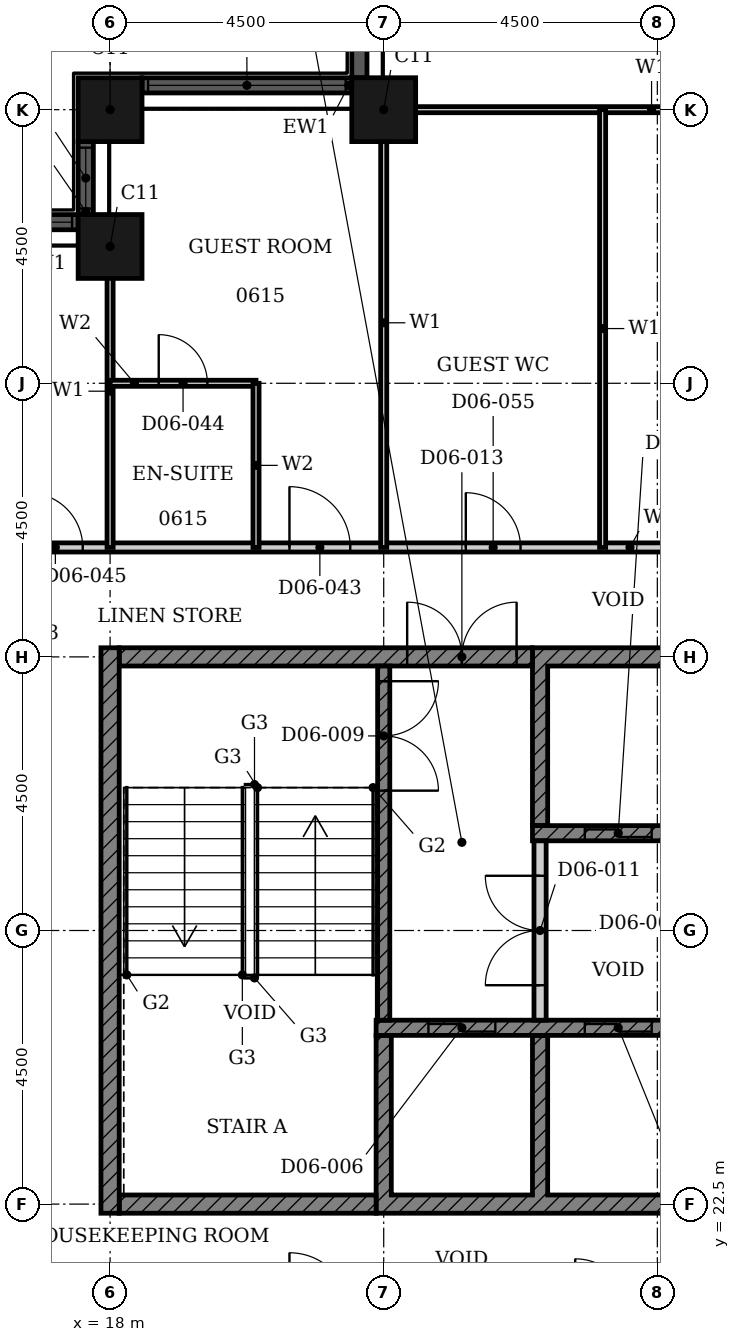
"""IFC4 building model, lengths in metres.
Left out: names, types, materials, properties, quantities, classifications, styles, units other than length and angle.
Written with IfcOpenShell. Run it as: python <this file> out.ifc"""

import sys

from ifc_helpers import new_model, si_unit, direction, frame, frame_2d, origin, origin_2d, place, context, subcontext, project, spatial, polyline, rectangle, hollow_rectangle, outline, extrude, element, fill, save


model = new_model("IFC4")
c1 = context("Model", 3, precision=1e-05, world=origin(), true_north=direction((0.0, 1.0)))
c2 = subcontext(c1, "Body", "Model", "MODEL_VIEW")
j1 = project(units=[si_unit("LENGTHUNIT", "METRE"), si_unit("PLANEANGLEUNIT", "RADIAN")], contexts=[c1])
p1 = place(None, origin())
s1 = spatial("IfcSite", under=j1, at=p1, CompositionType="ELEMENT")
p2 = place(p1, origin())
s2 = spatial("IfcBuilding", under=s1, at=p2, CompositionType="ELEMENT")
p3 = place(p2, frame((0.0, 0.0, 33.6)))
s3 = spatial("IfcBuildingStorey", under=s2, at=p3, CompositionType="ELEMENT", Elevation=33.6)
for number, where, z_axis, x_axis in (
    (1, (22.5, 40.5, 0.0), (0.0, 0.0, 1.0), (1.0, 0.0, 0.0)),
    (2, (18.0, 40.5, 0.0), (0.0, 0.0, 1.0), (1.0, 0.0, 0.0)),
    (3, (18.0, 38.25, 0.0), (0.0, 0.0, 1.0), (1.0, 0.0, 0.0)),
):
    element("IfcColumn", number, at=place(p3, frame(where, z_axis=z_axis, x_axis=x_axis)), inside=s3, PredefinedType="COLUMN", context=c2, shape_type="SweptSolid", body=[
        extrude(hollow_rectangle(XDim=1.05, YDim=1.05, WallThickness=0.034, at=origin_2d()), origin(), (0.0, 0.0, 1.0), 3.6),
    ])
p4 = place(p3, frame((22.1, 48.975, 0.0), z_axis=(0.0, 0.0, 1.0), x_axis=(0.0, -1.0, 0.0)))
e4 = element("IfcWall", 4, at=p4, inside=s3, PredefinedType="SOLIDWALL", context=c2, shape_type="SweptSolid", body=[
    extrude(rectangle(XDim=7.95, YDim=0.25, at=frame_2d((3.975, 0.0))), origin(), (0.0, 0.0, 1.0), 3.6),
])
p5 = place(p4, frame((0.1, 0.0, 0.9)))
e5 = element("IfcOpeningElement", 5, at=p5, cuts=e4, PredefinedType="OPENING", context=c2, shape_type="SweptSolid", body=[
    extrude(rectangle(XDim=3.25, YDim=2.08, at=frame_2d((1.625, 1.04))), frame((0.0, 0.135, 0.0), z_axis=(0.0, -1.0, 0.0), x_axis=(1.0, 0.0, 0.0)), (0.0, 0.0, 1.0), 0.27),
])
p6 = place(p4, frame((5.325, 0.0, 0.0)))
e6 = element("IfcOpeningElement", 6, at=p6, cuts=e4, PredefinedType="OPENING", context=c2, shape_type="SweptSolid", body=[
    extrude(rectangle(XDim=1.8, YDim=2.4, at=frame_2d((0.9, 1.2))), frame((0.0, 0.135, 0.0), z_axis=(0.0, -1.0, 0.0), x_axis=(1.0, 0.0, 0.0)), (0.0, 0.0, 1.0), 0.27),
])
p7 = place(p3, frame((21.975, 40.9, 0.0), z_axis=(0.0, 0.0, 1.0), x_axis=(-1.0, 0.0, 0.0)))
e7 = element("IfcWall", 7, at=p7, inside=s3, PredefinedType="SOLIDWALL", context=c2, shape_type="SweptSolid", body=[
    extrude(rectangle(XDim=3.45, YDim=0.25, at=frame_2d((1.725, 0.0))), origin(), (0.0, 0.0, 1.0), 3.6),
])
p8 = place(p7, frame((0.1, 0.0, 0.9)))
e8 = element("IfcOpeningElement", 8, at=p8, cuts=e7, PredefinedType="OPENING", context=c2, shape_type="SweptSolid", body=[
    extrude(rectangle(XDim=3.25, YDim=2.08, at=frame_2d((1.625, 1.04))), frame((0.0, 0.135, 0.0), z_axis=(0.0, -1.0, 0.0), x_axis=(1.0, 0.0, 0.0)), (0.0, 0.0, 1.0), 0.27),
])
p9 = place(p3, frame((17.6, 39.975, 0.0), z_axis=(0.0, 0.0, 1.0), x_axis=(0.0, -1.0, 0.0)))
e9 = element("IfcWall", 9, at=p9, inside=s3, PredefinedType="SOLIDWALL", context=c2, shape_type="SweptSolid", body=[
    extrude(rectangle(XDim=1.2, YDim=0.25, at=frame_2d((0.6, 0.0))), origin(), (0.0, 0.0, 1.0), 3.6),
])
p10 = place(p9, frame((0.1, 0.0, 0.9)))
e10 = element("IfcOpeningElement", 10, at=p10, cuts=e9, PredefinedType="OPENING", context=c2, shape_type="SweptSolid", body=[
    extrude(rectangle(XDim=1.0, YDim=2.08, at=frame_2d((0.5, 1.04))), frame((0.0, 0.135, 0.0), z_axis=(0.0, -1.0, 0.0), x_axis=(1.0, 0.0, 0.0)), (0.0, 0.0, 1.0), 0.27),
])
p11 = place(p3, frame((17.475, 38.65, 0.0), z_axis=(0.0, 0.0, 1.0), x_axis=(-1.0, 0.0, 0.0)))
e11 = element("IfcWall", 11, at=p11, inside=s3, PredefinedType="SOLIDWALL", context=c2, shape_type="SweptSolid", body=[
    extrude(rectangle(XDim=1.2, YDim=0.25, at=frame_2d((0.6, 0.0))), origin(), (0.0, 0.0, 1.0), 3.6),
])
p12 = place(p11, frame((0.1, 0.0, 0.9)))
e12 = element("IfcOpeningElement", 12, at=p12, cuts=e11, PredefinedType="OPENING", context=c2, shape_type="SweptSolid", body=[
    extrude(rectangle(XDim=1.0, YDim=2.08, at=frame_2d((0.5, 1.04))), frame((0.0, 0.135, 0.0), z_axis=(0.0, -1.0, 0.0), x_axis=(1.0, 0.0, 0.0)), (0.0, 0.0, 1.0), 0.27),
])
p13 = place(p3, origin())
e13 = element("IfcWall", 13, at=p13, inside=s3, PredefinedType="SHEAR", context=c2, shape_type="SweptSolid", body=[
    extrude(outline(polyline([(22.375, 22.35), (38.053, 22.35), (38.053, 25.275), (37.803, 25.275), (37.803, 22.65), (35.482, 22.65), (35.482, 25.275), (35.232, 25.275), (35.232, 22.65), (32.911, 22.65), (32.911, 25.275), (32.661, 25.275), (32.661, 22.65), (30.339, 22.65), (30.339, 25.275), (30.089, 25.275), (30.089, 22.65), (27.768, 22.65), (27.768, 25.275), (27.518, 25.275), (27.518, 22.65), (25.197, 22.65), (25.197, 25.275), (24.947, 25.275), (24.947, 22.65), (22.625, 22.65), (22.625, 25.275), (22.375, 25.275), (22.375, 22.35)])), origin(), (0.0, 0.0, 1.0), 3.3),
])
p14 = place(p3, origin())
e14 = element("IfcWall", 14, at=p14, inside=s3, PredefinedType="SHEAR", context=c2, shape_type="SweptSolid", body=[
    extrude(outline(polyline([(24.947, 28.725), (25.197, 28.725), (25.197, 31.35), (27.518, 31.35), (27.518, 28.725), (27.768, 28.725), (27.768, 31.35), (30.089, 31.35), (30.089, 28.725), (30.339, 28.725), (30.339, 31.35), (32.661, 31.35), (32.661, 28.725), (32.911, 28.725), (32.911, 31.35), (35.232, 31.35), (35.232, 28.725), (35.482, 28.725), (35.482, 31.35), (37.803, 31.35), (37.803, 28.725), (38.053, 28.725), (38.053, 31.35), (40.375, 31.35), (40.375, 28.725), (40.625, 28.725), (40.625, 31.65), (24.947, 31.65), (24.947, 28.725)])), origin(), (0.0, 0.0, 1.0), 3.3),
])
p15 = place(p3, frame((18.15, 22.5, 0.0), z_axis=(0.0, 0.0, 1.0), x_axis=(1.0, 0.0, 0.0)))
e15 = element("IfcWall", 15, at=p15, inside=s3, PredefinedType="SHEAR", context=c2, shape_type="SweptSolid", body=[
    extrude(rectangle(XDim=4.225, YDim=0.3, at=frame_2d((2.113, 0.0))), origin(), (0.0, 0.0, 1.0), 3.3),
])
p16 = place(p3, frame((18.15, 31.5, 0.0), z_axis=(0.0, 0.0, 1.0), x_axis=(1.0, 0.0, 0.0)))
e16 = element("IfcWall", 16, at=p16, inside=s3, PredefinedType="SHEAR", context=c2, shape_type="SweptSolid", body=[
    extrude(rectangle(XDim=6.797, YDim=0.3, at=frame_2d((3.398, 0.0))), origin(), (0.0, 0.0, 1.0), 3.3),
])
p17 = place(p16, frame((4.736, 0.0, 0.0)))
e17 = element("IfcOpeningElement", 17, at=p17, cuts=e16, PredefinedType="OPENING", context=c2, shape_type="SweptSolid", body=[
    extrude(rectangle(XDim=1.8, YDim=2.1, at=frame_2d((0.9, 1.05))), frame((0.0, 0.16, 0.0), z_axis=(0.0, -1.0, 0.0), x_axis=(1.0, 0.0, 0.0)), (0.0, 0.0, 1.0), 0.32),
])
p18 = place(p3, frame((18.0, 22.35, 0.0), z_axis=(0.0, 0.0, 1.0), x_axis=(0.0, 1.0, 0.0)))
e18 = element("IfcWall", 18, at=p18, inside=s3, PredefinedType="SHEAR", context=c2, shape_type="SweptSolid", body=[
    extrude(rectangle(XDim=9.3, YDim=0.3, at=frame_2d((4.65, 0.0))), origin(), (0.0, 0.0, 1.0), 3.3),
])
p19 = place(p3, frame((22.375, 25.4, 0.0), z_axis=(0.0, 0.0, 1.0), x_axis=(1.0, 0.0, 0.0)))
e19 = element("IfcWall", 19, at=p19, inside=s3, PredefinedType="SHEAR", context=c2, shape_type="SweptSolid", body=[
    extrude(rectangle(XDim=15.678, YDim=0.25, at=frame_2d((7.839, 0.0))), origin(), (0.0, 0.0, 1.0), 3.3),
])
p20 = place(p19, frame((3.432, 0.0, 0.0)))
e20 = element("IfcOpeningElement", 20, at=p20, cuts=e19, PredefinedType="OPENING", context=c2, shape_type="SweptSolid", body=[
    extrude(rectangle(XDim=1.1, YDim=2.1, at=frame_2d((0.55, 1.05))), frame((0.0, 0.135, 0.0), z_axis=(0.0, -1.0, 0.0), x_axis=(1.0, 0.0, 0.0)), (0.0, 0.0, 1.0), 0.27),
])
p21 = place(p19, frame((11.146, 0.0, 0.0)))
e21 = element("IfcOpeningElement", 21, at=p21, cuts=e19, PredefinedType="OPENING", context=c2, shape_type="SweptSolid", body=[
    extrude(rectangle(XDim=1.1, YDim=2.1, at=frame_2d((0.55, 1.05))), frame((0.0, 0.135, 0.0), z_axis=(0.0, -1.0, 0.0), x_axis=(1.0, 0.0, 0.0)), (0.0, 0.0, 1.0), 0.27),
])
p22 = place(p19, frame((13.718, 0.0, 0.0)))
e22 = element("IfcOpeningElement", 22, at=p22, cuts=e19, PredefinedType="OPENING", context=c2, shape_type="SweptSolid", body=[
    extrude(rectangle(XDim=1.1, YDim=2.1, at=frame_2d((0.55, 1.05))), frame((0.0, 0.135, 0.0), z_axis=(0.0, -1.0, 0.0), x_axis=(1.0, 0.0, 0.0)), (0.0, 0.0, 1.0), 0.27),
])
p23 = place(p19, frame((0.861, 0.0, 0.0)))
e23 = element("IfcOpeningElement", 23, at=p23, cuts=e19, PredefinedType="OPENING", context=c2, shape_type="SweptSolid", body=[
    extrude(rectangle(XDim=1.1, YDim=2.1, at=frame_2d((0.55, 1.05))), frame((0.0, 0.135, 0.0), z_axis=(0.0, -1.0, 0.0), x_axis=(1.0, 0.0, 0.0)), (0.0, 0.0, 1.0), 0.27),
])
p24 = place(p3, frame((24.947, 28.6, 0.0), z_axis=(0.0, 0.0, 1.0), x_axis=(1.0, 0.0, 0.0)))
e24 = element("IfcWall", 24, at=p24, inside=s3, PredefinedType="SHEAR", context=c2, shape_type="SweptSolid", body=[
    extrude(rectangle(XDim=15.678, YDim=0.25, at=frame_2d((7.839, 0.0))), origin(), (0.0, 0.0, 1.0), 3.3),
])
p25 = place(p24, frame((0.861, 0.0, 0.0)))
e25 = element("IfcOpeningElement", 25, at=p25, cuts=e24, PredefinedType="OPENING", context=c2, shape_type="SweptSolid", body=[
    extrude(rectangle(XDim=1.1, YDim=2.1, at=frame_2d((0.55, 1.05))), frame((0.0, 0.135, 0.0), z_axis=(0.0, -1.0, 0.0), x_axis=(1.0, 0.0, 0.0)), (0.0, 0.0, 1.0), 0.27),
])
p26 = place(p24, frame((8.575, 0.0, 0.0)))
e26 = element("IfcOpeningElement", 26, at=p26, cuts=e24, PredefinedType="OPENING", context=c2, shape_type="SweptSolid", body=[
    extrude(rectangle(XDim=1.1, YDim=2.1, at=frame_2d((0.55, 1.05))), frame((0.0, 0.135, 0.0), z_axis=(0.0, -1.0, 0.0), x_axis=(1.0, 0.0, 0.0)), (0.0, 0.0, 1.0), 0.27),
])
p27 = place(p24, frame((13.718, 0.0, 0.0)))
e27 = element("IfcOpeningElement", 27, at=p27, cuts=e24, PredefinedType="OPENING", context=c2, shape_type="SweptSolid", body=[
    extrude(rectangle(XDim=1.1, YDim=2.1, at=frame_2d((0.55, 1.05))), frame((0.0, 0.135, 0.0), z_axis=(0.0, -1.0, 0.0), x_axis=(1.0, 0.0, 0.0)), (0.0, 0.0, 1.0), 0.27),
])
p28 = place(p3, frame((22.5, 31.35, 0.0), z_axis=(0.0, 0.0, 1.0), x_axis=(0.0, -1.0, 0.0)))
e28 = element("IfcWall", 28, at=p28, inside=s3, PredefinedType="SHEAR", context=c2, shape_type="SweptSolid", body=[
    extrude(rectangle(XDim=5.825, YDim=0.2, at=frame_2d((2.913, 0.0))), origin(), (0.0, 0.0, 1.0), 3.3),
])
p29 = place(p28, frame((0.25, 0.0, 0.0)))
e29 = element("IfcOpeningElement", 29, at=p29, cuts=e28, PredefinedType="OPENING", context=c2, shape_type="SweptSolid", body=[
    extrude(rectangle(XDim=1.8, YDim=2.1, at=frame_2d((0.9, 1.05))), frame((0.0, 0.11, 0.0), z_axis=(0.0, -1.0, 0.0), x_axis=(1.0, 0.0, 0.0)), (0.0, 0.0, 1.0), 0.22),
])
p30 = place(p3, frame((25.072, 25.525, 0.0), z_axis=(0.0, 0.0, 1.0), x_axis=(0.0, 1.0, 0.0)))
e30 = element("IfcWall", 30, at=p30, inside=s3, PredefinedType="PARTITIONING", context=c2, shape_type="SweptSolid", body=[
    extrude(rectangle(XDim=2.95, YDim=0.2, at=frame_2d((1.475, 0.0))), origin(), (0.0, 0.0, 1.0), 3.3),
])
p31 = place(p30, frame((0.575, 0.0, 0.0)))
e31 = element("IfcOpeningElement", 31, at=p31, cuts=e30, PredefinedType="OPENING", context=c2, shape_type="SweptSolid", body=[
    extrude(rectangle(XDim=1.8, YDim=2.1, at=frame_2d((0.9, 1.05))), frame((0.0, 0.11, 0.0), z_axis=(0.0, -1.0, 0.0), x_axis=(1.0, 0.0, 0.0)), (0.0, 0.0, 1.0), 0.22),
])
p32 = place(p3, frame((16.2, 33.3, 0.0), z_axis=(0.0, 0.0, 1.0), x_axis=(1.0, 0.0, 0.0)))
e32 = element("IfcWall", 32, at=p32, inside=s3, PredefinedType="PARTITIONING", context=c2, shape_type="SweptSolid", body=[
    extrude(rectangle(XDim=15.3, YDim=0.15, at=frame_2d((7.65, 0.0))), origin(), (0.0, 0.0, 1.0), 3.3),
])
p33 = place(p32, frame((4.75, 0.0, 0.0)))
e33 = element("IfcOpeningElement", 33, at=p33, cuts=e32, PredefinedType="OPENING", context=c2, shape_type="SweptSolid", body=[
    extrude(rectangle(XDim=1.0, YDim=2.1, at=frame_2d((0.5, 1.05))), frame((0.0, 0.085, 0.0), z_axis=(0.0, -1.0, 0.0), x_axis=(1.0, 0.0, 0.0)), (0.0, 0.0, 1.0), 0.17),
])
p34 = place(p32, frame((0.45, 0.0, 0.0)))
e34 = element("IfcOpeningElement", 34, at=p34, cuts=e32, PredefinedType="OPENING", context=c2, shape_type="SweptSolid", body=[
    extrude(rectangle(XDim=0.9, YDim=2.1, at=frame_2d((0.45, 1.05))), frame((0.0, 0.085, 0.0), z_axis=(0.0, -1.0, 0.0), x_axis=(1.0, 0.0, 0.0)), (0.0, 0.0, 1.0), 0.17),
])
p35 = place(p32, frame((7.65, 0.0, 0.0)))
e35 = element("IfcOpeningElement", 35, at=p35, cuts=e32, PredefinedType="OPENING", context=c2, shape_type="SweptSolid", body=[
    extrude(rectangle(XDim=0.9, YDim=2.1, at=frame_2d((0.45, 1.05))), frame((0.0, 0.085, 0.0), z_axis=(0.0, -1.0, 0.0), x_axis=(1.0, 0.0, 0.0)), (0.0, 0.0, 1.0), 0.17),
])
p36 = place(p32, frame((12.15, 0.0, 0.0)))
e36 = element("IfcOpeningElement", 36, at=p36, cuts=e32, PredefinedType="OPENING", context=c2, shape_type="SweptSolid", body=[
    extrude(rectangle(XDim=0.9, YDim=2.1, at=frame_2d((0.45, 1.05))), frame((0.0, 0.085, 0.0), z_axis=(0.0, -1.0, 0.0), x_axis=(1.0, 0.0, 0.0)), (0.0, 0.0, 1.0), 0.17),
])
p37 = place(p3, frame((22.31, 40.5, 0.0), z_axis=(0.0, 0.0, 1.0), x_axis=(1.0, 0.0, 0.0)))
e37 = element("IfcWall", 37, at=p37, inside=s3, PredefinedType="PARTITIONING", context=c2, shape_type="SweptSolid", body=[
    extrude(rectangle(XDim=9.19, YDim=0.1, at=frame_2d((4.595, 0.0))), origin(), (0.0, 0.0, 1.0), 2.38),
])
p38 = place(p3, frame((18.0, 33.3, 0.0), z_axis=(0.0, 0.0, 1.0), x_axis=(0.0, 1.0, 0.0)))
e38 = element("IfcWall", 38, at=p38, inside=s3, PredefinedType="PARTITIONING", context=c2, shape_type="SweptSolid", body=[
    extrude(rectangle(XDim=5.14, YDim=0.1, at=frame_2d((2.57, 0.0))), origin(), (0.0, 0.0, 1.0), 3.3),
])
p39 = place(p3, frame((22.5, 33.3, 0.0), z_axis=(0.0, 0.0, 1.0), x_axis=(0.0, 1.0, 0.0)))
e39 = element("IfcWall", 39, at=p39, inside=s3, PredefinedType="PARTITIONING", context=c2, shape_type="SweptSolid", body=[
    extrude(rectangle(XDim=7.39, YDim=0.1, at=frame_2d((3.695, 0.0))), origin(), (0.0, 0.0, 1.0), 3.3),
])
p40 = place(p3, frame((26.1, 33.3, 0.0), z_axis=(0.0, 0.0, 1.0), x_axis=(0.0, 1.0, 0.0)))
e40 = element("IfcWall", 40, at=p40, inside=s3, PredefinedType="PARTITIONING", context=c2, shape_type="SweptSolid", body=[
    extrude(rectangle(XDim=7.2, YDim=0.1, at=frame_2d((3.6, 0.0))), origin(), (0.0, 0.0, 1.0), 3.3),
])
p41 = place(p3, frame((18.0, 36.0, 0.0), z_axis=(0.0, 0.0, 1.0), x_axis=(1.0, 0.0, 0.0)))
e41 = element("IfcWall", 41, at=p41, inside=s3, PredefinedType="PARTITIONING", context=c2, shape_type="SweptSolid", body=[
    extrude(rectangle(XDim=2.4, YDim=0.1, at=frame_2d((1.2, 0.0))), origin(), (0.0, 0.0, 1.0), 3.3),
])
p42 = place(p41, frame((0.8, 0.0, 0.0)))
e42 = element("IfcOpeningElement", 42, at=p42, cuts=e41, PredefinedType="OPENING", context=c2, shape_type="SweptSolid", body=[
    extrude(rectangle(XDim=0.8, YDim=2.1, at=frame_2d((0.4, 1.05))), frame((0.0, 0.06, 0.0), z_axis=(0.0, -1.0, 0.0), x_axis=(1.0, 0.0, 0.0)), (0.0, 0.0, 1.0), 0.12),
])
p43 = place(p3, frame((20.4, 33.3, 0.0), z_axis=(0.0, 0.0, 1.0), x_axis=(0.0, 1.0, 0.0)))
e43 = element("IfcWall", 43, at=p43, inside=s3, PredefinedType="PARTITIONING", context=c2, shape_type="SweptSolid", body=[
    extrude(rectangle(XDim=2.7, YDim=0.1, at=frame_2d((1.35, 0.0))), origin(), (0.0, 0.0, 1.0), 3.3),
])
p44 = place(p8, origin())
e44 = element("IfcWindow", 44, at=p44, inside=s3, PartitioningType="SINGLE_PANEL", PredefinedType="WINDOW", context=c2, shape_type="SweptSolid", body=[
    extrude(rectangle(XDim=3.25, YDim=2.08, at=frame_2d((1.625, 1.04))), frame((0.0, 0.03, 0.0), z_axis=(0.0, -1.0, 0.0), x_axis=(1.0, 0.0, 0.0)), (0.0, 0.0, 1.0), 0.06),
])
fill(e8, e44)
p45 = place(p10, origin())
e45 = element("IfcWindow", 45, at=p45, inside=s3, PartitioningType="SINGLE_PANEL", PredefinedType="WINDOW", context=c2, shape_type="SweptSolid", body=[
    extrude(rectangle(XDim=1.0, YDim=2.08, at=frame_2d((0.5, 1.04))), frame((0.0, 0.03, 0.0), z_axis=(0.0, -1.0, 0.0), x_axis=(1.0, 0.0, 0.0)), (0.0, 0.0, 1.0), 0.06),
])
fill(e10, e45)
p46 = place(p12, origin())
e46 = element("IfcWindow", 46, at=p46, inside=s3, PartitioningType="SINGLE_PANEL", PredefinedType="WINDOW", context=c2, shape_type="SweptSolid", body=[
    extrude(rectangle(XDim=1.0, YDim=2.08, at=frame_2d((0.5, 1.04))), frame((0.0, 0.03, 0.0), z_axis=(0.0, -1.0, 0.0), x_axis=(1.0, 0.0, 0.0)), (0.0, 0.0, 1.0), 0.06),
])
fill(e12, e46)
p47 = place(p20, origin())
e47 = element("IfcDoor", 47, at=p47, inside=s3, OperationType="DOUBLE_DOOR_SLIDING", PredefinedType="DOOR", context=c2, shape_type="SweptSolid", body=[
    extrude(rectangle(XDim=1.1, YDim=2.1, at=frame_2d((0.55, 1.05))), frame((0.0, 0.025, 0.0), z_axis=(0.0, -1.0, 0.0), x_axis=(1.0, 0.0, 0.0)), (0.0, 0.0, 1.0), 0.05),
])
fill(e20, e47)
p48 = place(p25, origin())
e48 = element("IfcDoor", 48, at=p48, inside=s3, OperationType="DOUBLE_DOOR_SLIDING", PredefinedType="DOOR", context=c2, shape_type="SweptSolid", body=[
    extrude(rectangle(XDim=1.1, YDim=2.1, at=frame_2d((0.55, 1.05))), frame((0.0, 0.025, 0.0), z_axis=(0.0, -1.0, 0.0), x_axis=(1.0, 0.0, 0.0)), (0.0, 0.0, 1.0), 0.05),
])
fill(e25, e48)
p49 = place(p23, origin())
e49 = element("IfcDoor", 49, at=p49, inside=s3, OperationType="DOUBLE_DOOR_SLIDING", PredefinedType="DOOR", context=c2, shape_type="SweptSolid", body=[
    extrude(rectangle(XDim=1.1, YDim=2.1, at=frame_2d((0.55, 1.05))), frame((0.0, 0.025, 0.0), z_axis=(0.0, -1.0, 0.0), x_axis=(1.0, 0.0, 0.0)), (0.0, 0.0, 1.0), 0.05),
])
fill(e23, e49)
p50 = place(p29, origin())
e50 = element("IfcDoor", 50, at=p50, inside=s3, OperationType="DOUBLE_DOOR_SINGLE_SWING", PredefinedType="DOOR", context=c2, shape_type="SweptSolid", body=[
    extrude(rectangle(XDim=1.8, YDim=2.1, at=frame_2d((0.9, 1.05))), frame((0.0, 0.025, 0.0), z_axis=(0.0, -1.0, 0.0), x_axis=(1.0, 0.0, 0.0)), (0.0, 0.0, 1.0), 0.05),
])
fill(e29, e50)
p51 = place(p31, origin())
e51 = element("IfcDoor", 51, at=p51, inside=s3, OperationType="DOUBLE_DOOR_SINGLE_SWING", PredefinedType="DOOR", context=c2, shape_type="SweptSolid", body=[
    extrude(rectangle(XDim=1.8, YDim=2.1, at=frame_2d((0.9, 1.05))), frame((0.0, 0.025, 0.0), z_axis=(0.0, -1.0, 0.0), x_axis=(1.0, 0.0, 0.0)), (0.0, 0.0, 1.0), 0.05),
])
fill(e31, e51)
p52 = place(p17, origin())
e52 = element("IfcDoor", 52, at=p52, inside=s3, OperationType="DOUBLE_DOOR_SINGLE_SWING", PredefinedType="DOOR", context=c2, shape_type="SweptSolid", body=[
    extrude(rectangle(XDim=1.8, YDim=2.1, at=frame_2d((0.9, 1.05))), frame((0.0, 0.025, 0.0), z_axis=(0.0, -1.0, 0.0), x_axis=(1.0, 0.0, 0.0)), (0.0, 0.0, 1.0), 0.05),
])
fill(e17, e52)
p53 = place(p33, origin())
e53 = element("IfcDoor", 53, at=p53, inside=s3, OperationType="SINGLE_SWING_RIGHT", PredefinedType="DOOR", context=c2, shape_type="SweptSolid", body=[
    extrude(rectangle(XDim=1.0, YDim=2.1, at=frame_2d((0.5, 1.05))), frame((0.0, 0.025, 0.0), z_axis=(0.0, -1.0, 0.0), x_axis=(1.0, 0.0, 0.0)), (0.0, 0.0, 1.0), 0.05),
])
fill(e33, e53)
p54 = place(p42, origin())
e54 = element("IfcDoor", 54, at=p54, inside=s3, OperationType="SINGLE_SWING_RIGHT", PredefinedType="DOOR", context=c2, shape_type="SweptSolid", body=[
    extrude(rectangle(XDim=0.8, YDim=2.1, at=frame_2d((0.4, 1.05))), frame((0.0, 0.025, 0.0), z_axis=(0.0, -1.0, 0.0), x_axis=(1.0, 0.0, 0.0)), (0.0, 0.0, 1.0), 0.05),
])
fill(e42, e54)
p55 = place(p34, origin())
e55 = element("IfcDoor", 55, at=p55, inside=s3, OperationType="SINGLE_SWING_LEFT", PredefinedType="DOOR", context=c2, shape_type="SweptSolid", body=[
    extrude(rectangle(XDim=0.9, YDim=2.1, at=frame_2d((0.45, 1.05))), frame((0.0, 0.025, 0.0), z_axis=(0.0, -1.0, 0.0), x_axis=(1.0, 0.0, 0.0)), (0.0, 0.0, 1.0), 0.05),
])
fill(e34, e55)
p56 = place(p35, origin())
e56 = element("IfcDoor", 56, at=p56, inside=s3, OperationType="SINGLE_SWING_RIGHT", PredefinedType="DOOR", context=c2, shape_type="SweptSolid", body=[
    extrude(rectangle(XDim=0.9, YDim=2.1, at=frame_2d((0.45, 1.05))), frame((0.0, 0.025, 0.0), z_axis=(0.0, -1.0, 0.0), x_axis=(1.0, 0.0, 0.0)), (0.0, 0.0, 1.0), 0.05),
])
fill(e35, e56)
save(model, sys.argv[1])
